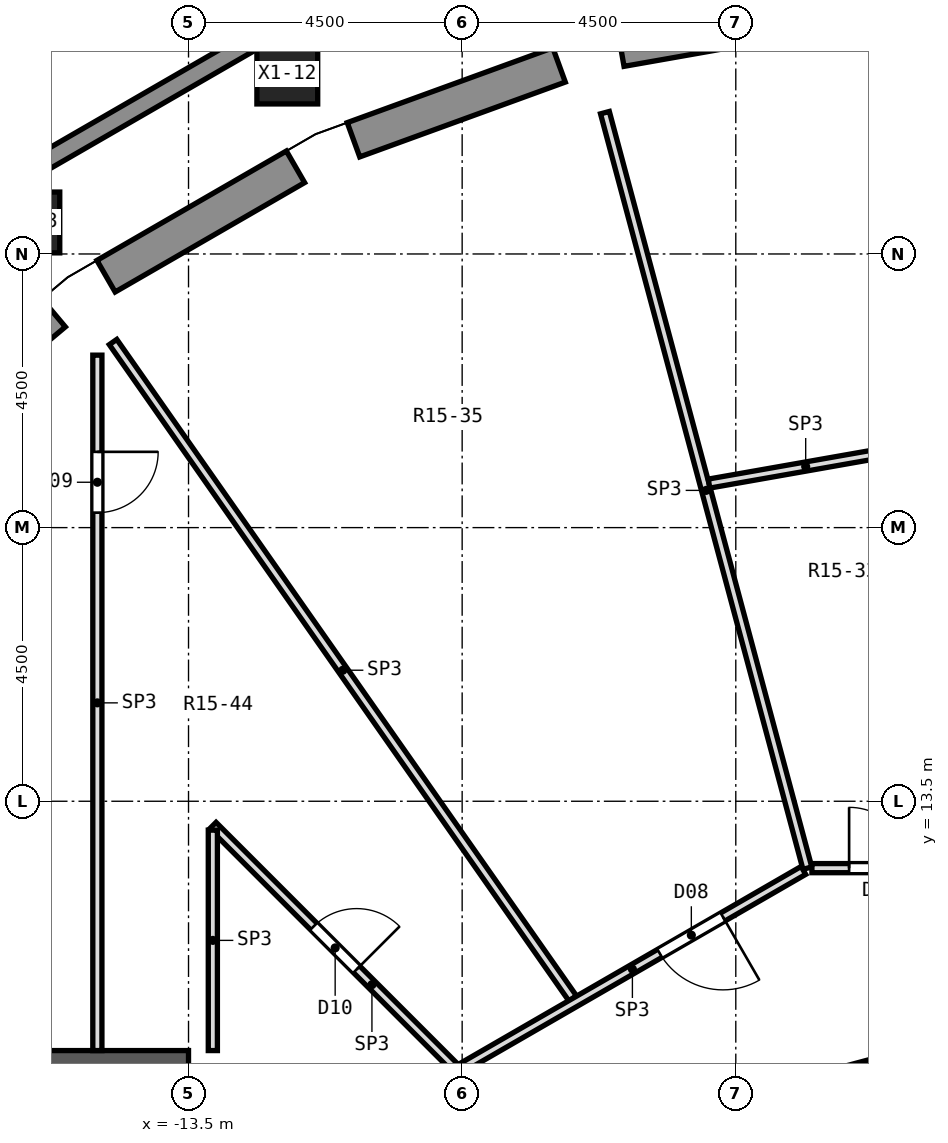
"""IFC4 building model, lengths in metres.
Left out: names, types, materials, properties, quantities, classifications, styles, units other than length and angle.
Written with IfcOpenShell. Run it as: python <this file> out.ifc"""

import sys

from ifc_helpers import new_model, si_unit, direction, frame, frame_2d, origin, origin_2d, place, context, subcontext, project, spatial, rectangle, hollow_rectangle, extrude, element, fill, save


model = new_model("IFC4")
c1 = context("Model", 3, precision=1e-05, world=origin(), true_north=direction((0.0, 1.0)))
c2 = subcontext(c1, "Body", "Model", "MODEL_VIEW")
j1 = project(units=[si_unit("LENGTHUNIT", "METRE"), si_unit("PLANEANGLEUNIT", "RADIAN")], contexts=[c1])
p1 = place(None, origin())
s1 = spatial("IfcSite", under=j1, at=p1, CompositionType="ELEMENT")
p2 = place(p1, origin())
s2 = spatial("IfcBuilding", under=s1, at=p2, CompositionType="ELEMENT")
p3 = place(p2, frame((0.0, 0.0, 82.4)))
s3 = spatial("IfcBuildingStorey", under=s2, at=p3, CompositionType="ELEMENT", Elevation=82.4)
for number, where, z_axis, x_axis in (
    (1, (-2.449, 27.993, 0.251), (0.044, -0.5, 0.865), (0.996, 0.087, 0.0)),
    (2, (-7.273, 27.143, 0.251), (0.13, -0.485, 0.865), (0.966, 0.259, 0.0)),
    (3, (-11.875, 25.467, 0.251), (0.212, -0.455, 0.865), (0.906, 0.423, 0.0)),
):
    element("IfcColumn", number, at=place(p3, frame(where, z_axis=z_axis, x_axis=x_axis)), inside=s3, PredefinedType="COLUMN", context=c2, shape_type="SweptSolid", body=[
        extrude(hollow_rectangle(XDim=1.0, YDim=1.0, WallThickness=0.06, at=origin_2d()), origin(), (0.0, 0.0, 1.0), 3.986),
    ])
p4 = place(p3, frame((-16.117, 23.018, 0.251), z_axis=(0.287737885382, -0.410966626418, 0.86505106282), x_axis=(0.819174562158, 0.573544276158, 0.0)))
e4 = element("IfcColumn", 4, at=p4, inside=s3, PredefinedType="COLUMN", context=c2, shape_type="SweptSolid", body=[
    extrude(hollow_rectangle(XDim=1.0, YDim=1.0, WallThickness=0.06, at=origin_2d()), origin(), (0.0, 0.0, 1.0), 3.986),
])
p5 = place(p3, frame((-2.364, 8.821, 0.0), z_axis=(0.0, 0.0, 1.0), x_axis=(-0.258819045103, 0.965925826289, 0.0)))
e5 = element("IfcColumn", 5, at=p5, inside=s3, PredefinedType="COLUMN", context=c2, shape_type="SweptSolid", body=[
    extrude(rectangle(XDim=0.8, YDim=0.8, at=origin_2d()), origin(), (0.0, 0.0, 1.0), 4.5),
])
p6 = place(p3, frame((-13.5, 9.0, 0.0), z_axis=(0.0, 0.0, 1.0), x_axis=(-1.0, 0.0, 0.0)))
e6 = element("IfcWall", 6, at=p6, inside=s3, PredefinedType="SHEAR", context=c2, shape_type="SweptSolid", body=[
    extrude(rectangle(XDim=10.4, YDim=0.8, at=frame_2d((5.2, 0.0))), origin(), (0.0, 0.0, 1.0), 4.5),
])
for number, where, z_axis, x_axis in (
    (7, (-2.847, 26.506, 0.0), (0.0, 0.0, 1.0), (-0.985, -0.174, 0.0)),
    (8, (-7.406, 25.608, 0.0), (0.0, 0.0, 1.0), (-0.94, -0.342, 0.0)),
    (9, (-11.741, 23.933, 0.0), (0.0, 0.0, 1.0), (-0.866, -0.5, 0.0)),
    (10, (-15.719, 21.531, 0.0), (0.0, 0.0, 1.0), (-0.766, -0.643, 0.0)),
):
    element("IfcWall", number, at=place(p3, frame(where, z_axis=z_axis, x_axis=x_axis)), inside=s3, PredefinedType="SOLIDWALL", context=c2, shape_type="SweptSolid", body=[
        extrude(rectangle(XDim=3.598, YDim=0.6, at=frame_2d((1.799, 0.0))), origin(), (0.0, 0.0, 1.0), 3.95),
    ])
p7 = place(p3, frame((-12.181, 26.153, 0.0), z_axis=(0.0, 0.0, 1.0), x_axis=(-0.866014270972, -0.500019282102, 0.0)))
e11 = element("IfcWall", 11, at=p7, inside=s3, PredefinedType="PARAPET", context=c2, shape_type="SweptSolid", body=[
    extrude(rectangle(XDim=5.055, YDim=0.3, at=frame_2d((2.527, 0.0))), origin(), (0.0, 0.0, 1.0), 1.1),
])
p8 = place(p3, frame((-6.652, 24.824, 0.0), z_axis=(0.0, 0.0, 1.0), x_axis=(0.258824952043, -0.96592424351, 0.0)))
e12 = element("IfcWall", 12, at=p8, inside=s3, PredefinedType="PARTITIONING", context=c2, shape_type="SweptSolid", body=[
    extrude(rectangle(XDim=12.862, YDim=0.15, at=frame_2d((6.431, 0.0))), origin(), (0.0, 0.0, 1.0), 3.95),
])
p9 = place(p3, frame((-14.741, 21.052, 0.0), z_axis=(0.0, 0.0, 1.0), x_axis=(0.573601596314, -0.819134426518, 0.0)))
e13 = element("IfcWall", 13, at=p9, inside=s3, PredefinedType="PARTITIONING", context=c2, shape_type="SweptSolid", body=[
    extrude(rectangle(XDim=13.178, YDim=0.15, at=frame_2d((6.589, 0.0))), origin(), (0.0, 0.0, 1.0), 3.95),
])
p10 = place(p3, frame((-13.1, 13.1, 0.0), z_axis=(0.0, 0.0, 1.0), x_axis=(0.707106781187, -0.707106781187, 0.0)))
e14 = element("IfcWall", 14, at=p10, inside=s3, PredefinedType="PARTITIONING", context=c2, shape_type="SweptSolid", body=[
    extrude(rectangle(XDim=5.69, YDim=0.15, at=frame_2d((2.845, 0.0))), origin(), (0.0, 0.0, 1.0), 3.95),
])
p11 = place(p10, frame((2.345, 0.0, 0.0)))
e15 = element("IfcOpeningElement", 15, at=p11, cuts=e14, PredefinedType="OPENING", context=c2, shape_type="SweptSolid", body=[
    extrude(rectangle(XDim=1.0, YDim=2.1, at=frame_2d((0.5, 1.05))), frame((0.0, 0.087, 0.0), z_axis=(0.0, -1.0, 0.0), x_axis=(1.0, 0.0, 0.0)), (0.0, 0.0, 1.0), 0.174),
])
p12 = place(p3, frame((-3.248, 12.4, 0.0), z_axis=(0.0, 0.0, 1.0), x_axis=(1.0, 0.0, 0.0)))
e16 = element("IfcWall", 16, at=p12, inside=s3, PredefinedType="PARTITIONING", context=c2, shape_type="SweptSolid", body=[
    extrude(rectangle(XDim=6.496, YDim=0.15, at=frame_2d((3.248, 0.0))), origin(), (0.0, 0.0, 1.0), 3.95),
])
p13 = place(p12, frame((4.885, 0.0, 0.0)))
e17 = element("IfcOpeningElement", 17, at=p13, cuts=e16, PredefinedType="OPENING", context=c2, shape_type="SweptSolid", body=[
    extrude(rectangle(XDim=1.0, YDim=2.1, at=frame_2d((0.5, 1.05))), frame((0.0, 0.087, 0.0), z_axis=(0.0, -1.0, 0.0), x_axis=(1.0, 0.0, 0.0)), (0.0, 0.0, 1.0), 0.174),
])
p14 = place(p12, frame((2.648, 0.0, 0.0)))
e18 = element("IfcOpeningElement", 18, at=p14, cuts=e16, PredefinedType="OPENING", context=c2, shape_type="SweptSolid", body=[
    extrude(rectangle(XDim=1.2, YDim=2.1, at=frame_2d((0.6, 1.05))), frame((0.0, 0.087, 0.0), z_axis=(0.0, -1.0, 0.0), x_axis=(1.0, 0.0, 0.0)), (0.0, 0.0, 1.0), 0.174),
])
p15 = place(p12, frame((0.612, 0.0, 0.0)))
e19 = element("IfcOpeningElement", 19, at=p15, cuts=e16, PredefinedType="OPENING", context=c2, shape_type="SweptSolid", body=[
    extrude(rectangle(XDim=1.0, YDim=2.1, at=frame_2d((0.5, 1.05))), frame((0.0, 0.087, 0.0), z_axis=(0.0, -1.0, 0.0), x_axis=(1.0, 0.0, 0.0)), (0.0, 0.0, 1.0), 0.174),
])
p16 = place(p3, frame((-4.94, 18.724, 0.0), z_axis=(0.0, 0.0, 1.0), x_axis=(0.984839105105, 0.173470277155, 0.0)))
e20 = element("IfcWall", 20, at=p16, inside=s3, PredefinedType="PARTITIONING", context=c2, shape_type="SweptSolid", body=[
    extrude(rectangle(XDim=3.227, YDim=0.15, at=frame_2d((1.614, 0.0))), origin(), (0.0, 0.0, 1.0), 3.95),
])
p17 = place(p3, frame((-9.012, 9.115, 0.0), z_axis=(0.0, 0.0, 1.0), x_axis=(0.865967095912, 0.5001009786, 0.0)))
e21 = element("IfcWall", 21, at=p17, inside=s3, PredefinedType="PARTITIONING", context=c2, shape_type="SweptSolid", body=[
    extrude(rectangle(XDim=6.495, YDim=0.15, at=frame_2d((3.248, 0.0))), origin(), (0.0, 0.0, 1.0), 3.95),
])
p18 = place(p17, frame((3.766, 0.0, 0.0)))
e22 = element("IfcOpeningElement", 22, at=p18, cuts=e21, PredefinedType="OPENING", context=c2, shape_type="SweptSolid", body=[
    extrude(rectangle(XDim=1.2, YDim=2.1, at=frame_2d((0.6, 1.05))), frame((0.0, 0.087, 0.0), z_axis=(0.0, -1.0, 0.0), x_axis=(1.0, 0.0, 0.0)), (0.0, 0.0, 1.0), 0.174),
])
p19 = place(p3, frame((-13.1, 9.4, 0.0), z_axis=(0.0, 0.0, 1.0), x_axis=(0.0, 1.0, 0.0)))
e23 = element("IfcWall", 23, at=p19, inside=s3, PredefinedType="PARTITIONING", context=c2, shape_type="SweptSolid", body=[
    extrude(rectangle(XDim=3.625, YDim=0.15, at=frame_2d((1.812, 0.0))), origin(), (0.0, 0.0, 1.0), 3.95),
])
p20 = place(p3, frame((-14.999, 9.4, 0.0), z_axis=(0.0, 0.0, 1.0), x_axis=(0.0, 1.0, 0.0)))
e24 = element("IfcWall", 24, at=p20, inside=s3, PredefinedType="PARTITIONING", context=c2, shape_type="SweptSolid", body=[
    extrude(rectangle(XDim=11.436, YDim=0.15, at=frame_2d((5.718, 0.0))), origin(), (0.0, 0.0, 1.0), 3.95),
])
p21 = place(p20, frame((8.846, 0.0, 0.0)))
e25 = element("IfcOpeningElement", 25, at=p21, cuts=e24, PredefinedType="OPENING", context=c2, shape_type="SweptSolid", body=[
    extrude(rectangle(XDim=1.0, YDim=2.1, at=frame_2d((0.5, 1.05))), frame((0.0, 0.087, 0.0), z_axis=(0.0, -1.0, 0.0), x_axis=(1.0, 0.0, 0.0)), (0.0, 0.0, 1.0), 0.174),
])
p22 = place(p15, origin())
e26 = element("IfcDoor", 26, at=p22, inside=s3, OperationType="SINGLE_SWING_LEFT", PredefinedType="DOOR", context=c2, shape_type="SweptSolid", body=[
    extrude(rectangle(XDim=1.0, YDim=2.1, at=frame_2d((0.5, 1.05))), frame((0.0, 0.025, 0.0), z_axis=(0.0, -1.0, 0.0), x_axis=(1.0, 0.0, 0.0)), (0.0, 0.0, 1.0), 0.05),
])
fill(e19, e26)
p23 = place(p18, frame((1.2, 0.0, 0.0), z_axis=(0.0, 0.0, 1.0), x_axis=(-1.0, 0.0, 0.0)))
e27 = element("IfcDoor", 27, at=p23, inside=s3, OperationType="SINGLE_SWING_LEFT", PredefinedType="DOOR", context=c2, shape_type="SweptSolid", body=[
    extrude(rectangle(XDim=1.2, YDim=2.1, at=frame_2d((0.6, 1.05))), frame((0.0, 0.025, 0.0), z_axis=(0.0, -1.0, 0.0), x_axis=(1.0, 0.0, 0.0)), (0.0, 0.0, 1.0), 0.05),
])
fill(e22, e27)
p24 = place(p21, frame((1.0, 0.0, 0.0), z_axis=(0.0, 0.0, 1.0), x_axis=(-1.0, 0.0, 0.0)))
e28 = element("IfcDoor", 28, at=p24, inside=s3, OperationType="SINGLE_SWING_LEFT", PredefinedType="DOOR", context=c2, shape_type="SweptSolid", body=[
    extrude(rectangle(XDim=1.0, YDim=2.1, at=frame_2d((0.5, 1.05))), frame((0.0, 0.025, 0.0), z_axis=(0.0, -1.0, 0.0), x_axis=(1.0, 0.0, 0.0)), (0.0, 0.0, 1.0), 0.05),
])
fill(e25, e28)
p25 = place(p11, origin())
e29 = element("IfcDoor", 29, at=p25, inside=s3, OperationType="SINGLE_SWING_RIGHT", PredefinedType="DOOR", context=c2, shape_type="SweptSolid", body=[
    extrude(rectangle(XDim=1.0, YDim=2.1, at=frame_2d((0.5, 1.05))), frame((0.0, 0.025, 0.0), z_axis=(0.0, -1.0, 0.0), x_axis=(1.0, 0.0, 0.0)), (0.0, 0.0, 1.0), 0.05),
])
fill(e15, e29)
save(model, sys.argv[1])
